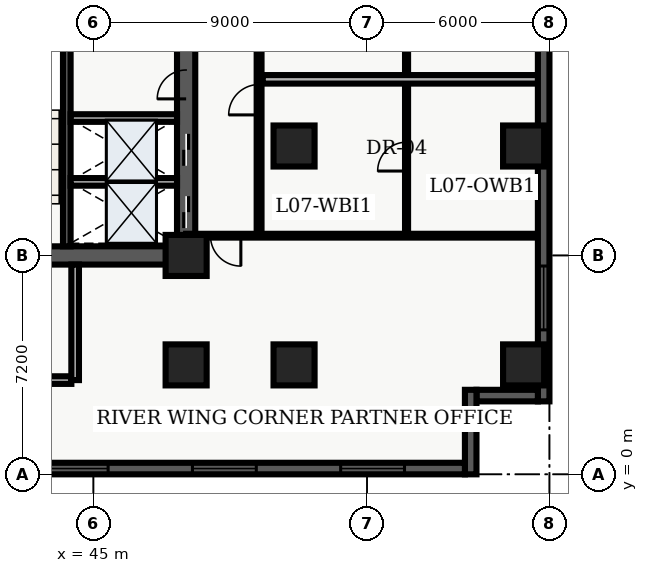
"""IFC4 building model, lengths in metres.
Left out: names, types, materials, properties, quantities, classifications, styles, units other than length and angle.
Written with IfcOpenShell. Run it as: python <this file> out.ifc"""

import sys

from ifc_helpers import new_model, entity, si_unit, converted_unit, direction, frame, origin_with_axes, origin_2d_with_axis, place, context, subcontext, project, spatial, polyline, rectangle, outline, extrude, element, fill, save


model = new_model("IFC4")
c1 = context("Model", 3, precision=1e-05, world=origin_with_axes(), true_north=direction((0.0, 1.0)))
c2 = subcontext(c1, "Body", "Model", "MODEL_VIEW")
j1 = project(units=[si_unit("LENGTHUNIT", "METRE"), converted_unit("PLANEANGLEUNIT", "DEGREE", entity("IfcPlaneAngleMeasure", 0.017), si_unit("PLANEANGLEUNIT", "RADIAN"), dimensions=[0, 0, 0, 0, 0, 0, 0])], contexts=[c1])
p1 = place(None, origin_with_axes())
s1 = spatial("IfcSite", under=j1, at=p1, CompositionType="ELEMENT")
p2 = place(p1, origin_with_axes())
s2 = spatial("IfcBuilding", under=s1, at=p2, CompositionType="ELEMENT")
p3 = place(p2, frame((0.0, 0.0, 32.7), z_axis=(0.0, 0.0, 1.0), x_axis=(1.0, 0.0, 0.0)))
s3 = spatial("IfcBuildingStorey", under=s2, at=p3, CompositionType="ELEMENT", Elevation=32.7)
p4 = place(p3, frame((40.2, 7.2, 0.0), z_axis=(0.0, 0.0, 1.0), x_axis=(1.0, 0.0, 0.0)))
e1 = element("IfcWall", 1, at=p4, inside=s3, PredefinedType="SHEAR", context=c2, shape_type="SweptSolid", body=[
    extrude(outline(polyline([(0.0, -0.3), (7.85, -0.3), (7.85, 0.3), (0.0, 0.3), (0.0, -0.3)])), origin_with_axes(), (0.0, 0.0, 1.0), 3.66),
])
p5 = place(p4, frame((2.175, 0.0, 0.0), z_axis=(0.0, 0.0, 1.0), x_axis=(1.0, 0.0, 0.0)))
e2 = element("IfcOpeningElement", 2, at=p5, cuts=e1, PredefinedType="OPENING", context=c2, shape_type="SweptSolid", body=[
    extrude(rectangle(XDim=1.05, YDim=0.62, at=origin_2d_with_axis()), origin_with_axes(), (0.0, 0.0, 1.0), 2.15),
])
p6 = place(p3, frame((48.05, 7.2, 0.0), z_axis=(0.0, 0.0, 1.0), x_axis=(0.0, 1.0, 0.0)))
e3 = element("IfcWall", 3, at=p6, inside=s3, PredefinedType="SHEAR", context=c2, shape_type="SweptSolid", body=[
    extrude(outline(polyline([(0.0, -0.3), (15.6, -0.3), (15.6, 0.3), (0.0, 0.3), (0.0, -0.3)])), origin_with_axes(), (0.0, 0.0, 1.0), 3.66),
])
p7 = place(p6, frame((1.425, 0.0, 0.0), z_axis=(0.0, 0.0, 1.0), x_axis=(1.0, 0.0, 0.0)))
e4 = element("IfcOpeningElement", 4, at=p7, cuts=e3, PredefinedType="OPENING", context=c2, shape_type="SweptSolid", body=[
    extrude(rectangle(XDim=1.05, YDim=0.62, at=origin_2d_with_axis()), origin_with_axes(), (0.0, 0.0, 1.0), 2.15),
])
p8 = place(p6, frame((3.475, 0.0, 0.0), z_axis=(0.0, 0.0, 1.0), x_axis=(1.0, 0.0, 0.0)))
e5 = element("IfcOpeningElement", 5, at=p8, cuts=e3, PredefinedType="OPENING", context=c2, shape_type="SweptSolid", body=[
    extrude(rectangle(XDim=1.05, YDim=0.62, at=origin_2d_with_axis()), origin_with_axes(), (0.0, 0.0, 1.0), 2.15),
])
p9 = place(p6, frame((5.625, 0.0, 0.0), z_axis=(0.0, 0.0, 1.0), x_axis=(1.0, 0.0, 0.0)))
e6 = element("IfcOpeningElement", 6, at=p9, cuts=e3, PredefinedType="OPENING", context=c2, shape_type="SweptSolid", body=[
    extrude(rectangle(XDim=0.95, YDim=0.62, at=origin_2d_with_axis()), origin_with_axes(), (0.0, 0.0, 1.0), 2.15),
])
p10 = place(p3, frame((44.125, 7.5, 0.0), z_axis=(0.0, 0.0, 1.0), x_axis=(0.0, 1.0, 0.0)))
e7 = element("IfcWall", 7, at=p10, inside=s3, PredefinedType="SHEAR", context=c2, shape_type="SweptSolid", body=[
    extrude(outline(polyline([(0.0, -0.125), (15.0, -0.125), (15.0, 0.125), (0.0, 0.125), (0.0, -0.125)])), origin_with_axes(), (0.0, 0.0, 1.0), 3.66),
])
p11 = place(p3, frame((40.325, 3.1, 0.0), z_axis=(0.0, 0.0, 1.0), x_axis=(1.0, 0.0, 0.0)))
e8 = element("IfcWall", 8, at=p11, inside=s3, PredefinedType="SOLIDWALL", context=c2, shape_type="SweptSolid", body=[
    extrude(outline(polyline([(0.0, -0.125), (3.95, -0.125), (3.95, 0.125), (0.0, 0.125), (0.0, -0.125)])), origin_with_axes(), (0.0, 0.0, 1.0), 2.7),
])
p12 = place(p3, frame((44.4, 3.1, 0.0), z_axis=(0.0, 0.0, 1.0), x_axis=(0.0, 1.0, 0.0)))
e9 = element("IfcWall", 9, at=p12, inside=s3, PredefinedType="SOLIDWALL", context=c2, shape_type="SweptSolid", body=[
    extrude(outline(polyline([(0.0, -0.125), (3.8, -0.125), (3.8, 0.125), (0.0, 0.125), (0.0, -0.125)])), origin_with_axes(), (0.0, 0.0, 1.0), 2.7),
])
for number, where, z_axis, x_axis in (
    (10, (48.05, 3.6, 0.0), (0.0, 0.0, 1.0), (1.0, 0.0, 0.0)),
    (11, (48.05, 7.2, 0.0), (0.0, 0.0, 1.0), (1.0, 0.0, 0.0)),
    (12, (51.6, 3.6, 0.0), (0.0, 0.0, 1.0), (1.0, 0.0, 0.0)),
    (13, (51.6, 10.8, 0.0), (0.0, 0.0, 1.0), (1.0, 0.0, 0.0)),
    (14, (59.15, 3.6, 0.0), (0.0, 0.0, 1.0), (1.0, 0.0, 0.0)),
    (15, (59.15, 10.8, 0.0), (0.0, 0.0, 1.0), (1.0, 0.0, 0.0)),
):
    element("IfcColumn", number, at=place(p3, frame(where, z_axis=z_axis, x_axis=x_axis)), inside=s3, PredefinedType="COLUMN", context=c2, shape_type="SweptSolid", body=[
        extrude(rectangle(XDim=1.35, YDim=1.35, at=origin_2d_with_axis()), origin_with_axes(), (0.0, 0.0, 1.0), 3.9),
    ])
for number, where, z_axis, x_axis in (
    (16, (44.25, 9.62, 0.0), (0.0, 0.0, 1.0), (1.0, 0.0, 0.0)),
    (17, (44.25, 11.72, 0.0), (0.0, 0.0, 1.0), (1.0, 0.0, 0.0)),
):
    element("IfcWall", number, at=place(p3, frame(where, z_axis=z_axis, x_axis=x_axis)), inside=s3, PredefinedType="SOLIDWALL", context=c2, shape_type="SweptSolid", body=[
        extrude(outline(polyline([(0.0, -0.125), (3.5, -0.125), (3.5, 0.125), (0.0, 0.125), (0.0, -0.125)])), origin_with_axes(), (0.0, 0.0, 1.0), 2.7),
    ])
p13 = place(p3, frame((50.45, 7.85, 0.0), z_axis=(0.0, 0.0, 1.0), x_axis=(0.0, 1.0, 0.0)))
e18 = element("IfcWall", 18, at=p13, inside=s3, PredefinedType="PARTITIONING", context=c2, shape_type="SweptSolid", body=[
    extrude(outline(polyline([(0.0, -0.08), (18.8, -0.08), (18.8, 0.08), (0.0, 0.08), (0.0, -0.08)])), origin_with_axes(), (0.0, 0.0, 1.0), 2.7),
])
p14 = place(p13, frame((4.473, 0.0, 0.0), z_axis=(0.0, 0.0, 1.0), x_axis=(1.0, 0.0, 0.0)))
e19 = element("IfcOpeningElement", 19, at=p14, cuts=e18, PredefinedType="OPENING", context=c2, shape_type="SweptSolid", body=[
    extrude(rectangle(XDim=1.0, YDim=0.18, at=origin_2d_with_axis()), origin_with_axes(), (0.0, 0.0, 1.0), 2.15),
])
p15 = place(p13, frame((7.597, 0.0, 0.0), z_axis=(0.0, 0.0, 1.0), x_axis=(1.0, 0.0, 0.0)))
e20 = element("IfcOpeningElement", 20, at=p15, cuts=e18, PredefinedType="OPENING", context=c2, shape_type="SweptSolid", body=[
    extrude(rectangle(XDim=1.0, YDim=0.18, at=origin_2d_with_axis()), origin_with_axes(), (0.0, 0.0, 1.0), 2.15),
])
p16 = place(p13, frame((14.075, 0.0, 0.0), z_axis=(0.0, 0.0, 1.0), x_axis=(1.0, 0.0, 0.0)))
e21 = element("IfcOpeningElement", 21, at=p16, cuts=e18, PredefinedType="OPENING", context=c2, shape_type="SweptSolid", body=[
    extrude(rectangle(XDim=1.0, YDim=0.18, at=origin_2d_with_axis()), origin_with_axes(), (0.0, 0.0, 1.0), 2.15),
])
p17 = place(p3, frame((59.64, 7.85, 0.0), z_axis=(0.0, 0.0, 1.0), x_axis=(-1.0, 0.0, 0.0)))
e22 = element("IfcWall", 22, at=p17, inside=s3, PredefinedType="PARTITIONING", context=c2, shape_type="SweptSolid", body=[
    extrude(outline(polyline([(0.0, -0.062), (11.59, -0.062), (11.59, 0.062), (0.0, 0.062), (0.0, -0.062)])), origin_with_axes(), (0.0, 0.0, 1.0), 2.7),
])
p18 = place(p17, frame((10.29, 0.0, 0.0), z_axis=(0.0, 0.0, 1.0), x_axis=(1.0, 0.0, 0.0)))
e23 = element("IfcOpeningElement", 23, at=p18, cuts=e22, PredefinedType="OPENING", context=c2, shape_type="SweptSolid", body=[
    extrude(rectangle(XDim=1.0, YDim=0.145, at=origin_2d_with_axis()), origin_with_axes(), (0.0, 0.0, 1.0), 2.15),
])
p19 = place(p3, frame((55.3, 7.98, 0.0), z_axis=(0.0, 0.0, 1.0), x_axis=(0.0, 1.0, 0.0)))
e24 = element("IfcWall", 24, at=p19, inside=s3, PredefinedType="PARTITIONING", context=c2, shape_type="SweptSolid", body=[
    extrude(outline(polyline([(0.0, -0.05), (18.54, -0.05), (18.54, 0.05), (0.0, 0.05), (0.0, -0.05)])), origin_with_axes(), (0.0, 0.0, 1.0), 2.7),
])
p20 = place(p19, frame((2.471, 0.0, 0.0), z_axis=(0.0, 0.0, 1.0), x_axis=(1.0, 0.0, 0.0)))
e25 = element("IfcOpeningElement", 25, at=p20, cuts=e24, PredefinedType="OPENING", context=c2, shape_type="SweptSolid", body=[
    extrude(rectangle(XDim=0.95, YDim=0.12, at=origin_2d_with_axis()), origin_with_axes(), (0.0, 0.0, 1.0), 2.15),
])
p21 = place(p19, frame((8.027, 0.0, 0.0), z_axis=(0.0, 0.0, 1.0), x_axis=(1.0, 0.0, 0.0)))
e26 = element("IfcOpeningElement", 26, at=p21, cuts=e24, PredefinedType="OPENING", context=c2, shape_type="SweptSolid", body=[
    extrude(rectangle(XDim=0.95, YDim=0.12, at=origin_2d_with_axis()), origin_with_axes(), (0.0, 0.0, 1.0), 2.15),
])
p22 = place(p19, frame((14.825, 0.0, 0.0), z_axis=(0.0, 0.0, 1.0), x_axis=(1.0, 0.0, 0.0)))
e27 = element("IfcOpeningElement", 27, at=p22, cuts=e24, PredefinedType="OPENING", context=c2, shape_type="SweptSolid", body=[
    extrude(rectangle(XDim=0.95, YDim=0.12, at=origin_2d_with_axis()), origin_with_axes(), (0.0, 0.0, 1.0), 2.15),
])
p23 = place(p3, frame((50.57, 12.993, 0.0), z_axis=(0.0, 0.0, 1.0), x_axis=(1.0, 0.0, 0.0)))
e28 = element("IfcWall", 28, at=p23, inside=s3, PredefinedType="PARTITIONING", context=c2, shape_type="SweptSolid", body=[
    extrude(outline(polyline([(0.0, -0.14), (9.055, -0.14), (9.055, 0.14), (0.0, 0.14), (0.0, -0.14)])), origin_with_axes(), (0.0, 0.0, 1.0), 2.7),
])
p24 = place(p3, frame((59.81, 26.02, 0.0), z_axis=(0.0, 0.0, 1.0), x_axis=(0.0, -1.0, 0.0)))
e29 = element("IfcWall", 29, at=p24, inside=s3, PredefinedType="SOLIDWALL", context=c2, shape_type="SweptSolid", body=[
    extrude(outline(polyline([(0.0, -0.19), (23.62, -0.19), (23.62, 0.19), (0.0, 0.19), (0.0, -0.19)])), origin_with_axes(), (0.0, 0.0, 1.0), 3.66),
])
p25 = place(p24, frame((3.853, 0.0, 0.45), z_axis=(0.0, 0.0, 1.0), x_axis=(1.0, 0.0, 0.0)))
e30 = element("IfcOpeningElement", 30, at=p25, cuts=e29, PredefinedType="OPENING", context=c2, shape_type="SweptSolid", body=[
    extrude(rectangle(XDim=2.1, YDim=0.4, at=origin_2d_with_axis()), origin_with_axes(), (0.0, 0.0, 1.0), 2.2),
])
p26 = place(p24, frame((20.218, 0.0, 0.45), z_axis=(0.0, 0.0, 1.0), x_axis=(1.0, 0.0, 0.0)))
e31 = element("IfcOpeningElement", 31, at=p26, cuts=e29, PredefinedType="OPENING", context=c2, shape_type="SweptSolid", body=[
    extrude(rectangle(XDim=2.1, YDim=0.4, at=origin_2d_with_axis()), origin_with_axes(), (0.0, 0.0, 1.0), 2.2),
])
p27 = place(p3, frame((59.62, 2.59, 0.0), z_axis=(0.0, 0.0, 1.0), x_axis=(-1.0, 0.0, 0.0)))
e32 = element("IfcWall", 32, at=p27, inside=s3, PredefinedType="SOLIDWALL", context=c2, shape_type="SweptSolid", body=[
    extrude(outline(polyline([(0.0, -0.19), (2.02, -0.19), (2.02, 0.19), (0.0, 0.19), (0.0, -0.19)])), origin_with_axes(), (0.0, 0.0, 1.0), 3.66),
])
p28 = place(p3, frame((57.41, 2.78, 0.0), z_axis=(0.0, 0.0, 1.0), x_axis=(0.0, -1.0, 0.0)))
e33 = element("IfcWall", 33, at=p28, inside=s3, PredefinedType="SOLIDWALL", context=c2, shape_type="SweptSolid", body=[
    extrude(outline(polyline([(0.0, -0.19), (2.78, -0.19), (2.78, 0.19), (0.0, 0.19), (0.0, -0.19)])), origin_with_axes(), (0.0, 0.0, 1.0), 3.66),
])
p29 = place(p3, frame((57.22, 0.19, 0.0), z_axis=(0.0, 0.0, 1.0), x_axis=(-1.0, 0.0, 0.0)))
e34 = element("IfcWall", 34, at=p29, inside=s3, PredefinedType="SOLIDWALL", context=c2, shape_type="SweptSolid", body=[
    extrude(outline(polyline([(0.0, -0.19), (54.82, -0.19), (54.82, 0.19), (0.0, 0.19), (0.0, -0.19)])), origin_with_axes(), (0.0, 0.0, 1.0), 3.66),
])
p30 = place(p29, frame((3.037, 0.0, 0.45), z_axis=(0.0, 0.0, 1.0), x_axis=(1.0, 0.0, 0.0)))
e35 = element("IfcOpeningElement", 35, at=p30, cuts=e34, PredefinedType="OPENING", context=c2, shape_type="SweptSolid", body=[
    extrude(rectangle(XDim=2.1, YDim=0.4, at=origin_2d_with_axis()), origin_with_axes(), (0.0, 0.0, 1.0), 2.2),
])
p31 = place(p29, frame((7.912, 0.0, 0.45), z_axis=(0.0, 0.0, 1.0), x_axis=(1.0, 0.0, 0.0)))
e36 = element("IfcOpeningElement", 36, at=p31, cuts=e34, PredefinedType="OPENING", context=c2, shape_type="SweptSolid", body=[
    extrude(rectangle(XDim=2.1, YDim=0.4, at=origin_2d_with_axis()), origin_with_axes(), (0.0, 0.0, 1.0), 2.2),
])
p32 = place(p29, frame((12.786, 0.0, 0.45), z_axis=(0.0, 0.0, 1.0), x_axis=(1.0, 0.0, 0.0)))
e37 = element("IfcOpeningElement", 37, at=p32, cuts=e34, PredefinedType="OPENING", context=c2, shape_type="SweptSolid", body=[
    extrude(rectangle(XDim=2.1, YDim=0.4, at=origin_2d_with_axis()), origin_with_axes(), (0.0, 0.0, 1.0), 2.2),
])
p33 = place(p29, frame((17.661, 0.0, 0.45), z_axis=(0.0, 0.0, 1.0), x_axis=(1.0, 0.0, 0.0)))
e38 = element("IfcOpeningElement", 38, at=p33, cuts=e34, PredefinedType="OPENING", context=c2, shape_type="SweptSolid", body=[
    extrude(rectangle(XDim=2.1, YDim=0.4, at=origin_2d_with_axis()), origin_with_axes(), (0.0, 0.0, 1.0), 2.2),
])
p34 = place(p29, frame((22.535, 0.0, 0.45), z_axis=(0.0, 0.0, 1.0), x_axis=(1.0, 0.0, 0.0)))
e39 = element("IfcOpeningElement", 39, at=p34, cuts=e34, PredefinedType="OPENING", context=c2, shape_type="SweptSolid", body=[
    extrude(rectangle(XDim=2.1, YDim=0.4, at=origin_2d_with_axis()), origin_with_axes(), (0.0, 0.0, 1.0), 2.2),
])
p35 = place(p29, frame((27.41, 0.0, 0.45), z_axis=(0.0, 0.0, 1.0), x_axis=(1.0, 0.0, 0.0)))
e40 = element("IfcOpeningElement", 40, at=p35, cuts=e34, PredefinedType="OPENING", context=c2, shape_type="SweptSolid", body=[
    extrude(rectangle(XDim=2.1, YDim=0.4, at=origin_2d_with_axis()), origin_with_axes(), (0.0, 0.0, 1.0), 2.2),
])
p36 = place(p29, frame((32.285, 0.0, 0.45), z_axis=(0.0, 0.0, 1.0), x_axis=(1.0, 0.0, 0.0)))
e41 = element("IfcOpeningElement", 41, at=p36, cuts=e34, PredefinedType="OPENING", context=c2, shape_type="SweptSolid", body=[
    extrude(rectangle(XDim=2.1, YDim=0.4, at=origin_2d_with_axis()), origin_with_axes(), (0.0, 0.0, 1.0), 2.2),
])
p37 = place(p29, frame((37.159, 0.0, 0.45), z_axis=(0.0, 0.0, 1.0), x_axis=(1.0, 0.0, 0.0)))
e42 = element("IfcOpeningElement", 42, at=p37, cuts=e34, PredefinedType="OPENING", context=c2, shape_type="SweptSolid", body=[
    extrude(rectangle(XDim=2.1, YDim=0.4, at=origin_2d_with_axis()), origin_with_axes(), (0.0, 0.0, 1.0), 2.2),
])
p38 = place(p29, frame((42.034, 0.0, 0.45), z_axis=(0.0, 0.0, 1.0), x_axis=(1.0, 0.0, 0.0)))
e43 = element("IfcOpeningElement", 43, at=p38, cuts=e34, PredefinedType="OPENING", context=c2, shape_type="SweptSolid", body=[
    extrude(rectangle(XDim=2.1, YDim=0.4, at=origin_2d_with_axis()), origin_with_axes(), (0.0, 0.0, 1.0), 2.2),
])
p39 = place(p29, frame((51.783, 0.0, 0.45), z_axis=(0.0, 0.0, 1.0), x_axis=(1.0, 0.0, 0.0)))
e44 = element("IfcOpeningElement", 44, at=p39, cuts=e34, PredefinedType="OPENING", context=c2, shape_type="SweptSolid", body=[
    extrude(rectangle(XDim=2.1, YDim=0.4, at=origin_2d_with_axis()), origin_with_axes(), (0.0, 0.0, 1.0), 2.2),
])
p40 = place(p6, frame((1.425, 0.0, 0.0), z_axis=(0.0, 0.0, 1.0), x_axis=(1.0, 0.0, 0.0)))
e45 = element("IfcDoor", 45, at=p40, inside=s3, OperationType="SLIDING_TO_LEFT", PredefinedType="DOOR", context=c2, shape_type="SweptSolid", body=[
    extrude(rectangle(XDim=1.05, YDim=0.09, at=origin_2d_with_axis()), origin_with_axes(), (0.0, 0.0, 1.0), 2.15),
])
fill(e4, e45)
p41 = place(p6, frame((3.475, 0.0, 0.0), z_axis=(0.0, 0.0, 1.0), x_axis=(1.0, 0.0, 0.0)))
e46 = element("IfcDoor", 46, at=p41, inside=s3, OperationType="SLIDING_TO_RIGHT", PredefinedType="DOOR", context=c2, shape_type="SweptSolid", body=[
    extrude(rectangle(XDim=1.05, YDim=0.09, at=origin_2d_with_axis()), origin_with_axes(), (0.0, 0.0, 1.0), 2.15),
])
fill(e5, e46)
p42 = place(p6, frame((5.625, 0.0, 0.0), z_axis=(0.0, 0.0, 1.0), x_axis=(1.0, 0.0, 0.0)))
e47 = element("IfcDoor", 47, at=p42, inside=s3, OperationType="SINGLE_SWING_LEFT", PredefinedType="DOOR", context=c2, shape_type="SweptSolid", body=[
    extrude(rectangle(XDim=0.95, YDim=0.09, at=origin_2d_with_axis()), origin_with_axes(), (0.0, 0.0, 1.0), 2.15),
])
fill(e6, e47)
p43 = place(p17, frame((10.29, 0.0, 0.0), z_axis=(0.0, 0.0, 1.0), x_axis=(1.0, 0.0, 0.0)))
e48 = element("IfcDoor", 48, at=p43, inside=s3, OperationType="SINGLE_SWING_LEFT", PredefinedType="DOOR", context=c2, shape_type="SweptSolid", body=[
    extrude(rectangle(XDim=1.0, YDim=0.075, at=origin_2d_with_axis()), origin_with_axes(), (0.0, 0.0, 1.0), 2.15),
])
fill(e23, e48)
p44 = place(p19, frame((2.471, 0.0, 0.0), z_axis=(0.0, 0.0, 1.0), x_axis=(1.0, 0.0, 0.0)))
e49 = element("IfcDoor", 49, at=p44, inside=s3, OperationType="SINGLE_SWING_LEFT", PredefinedType="DOOR", context=c2, shape_type="SweptSolid", body=[
    extrude(rectangle(XDim=0.95, YDim=0.06, at=origin_2d_with_axis()), origin_with_axes(), (0.0, 0.0, 1.0), 2.15),
])
fill(e25, e49)
p45 = place(p13, frame((4.473, 0.0, 0.0), z_axis=(0.0, 0.0, 1.0), x_axis=(1.0, 0.0, 0.0)))
e50 = element("IfcDoor", 50, at=p45, inside=s3, OperationType="SINGLE_SWING_LEFT", PredefinedType="DOOR", context=c2, shape_type="SweptSolid", body=[
    extrude(rectangle(XDim=1.0, YDim=0.09, at=origin_2d_with_axis()), origin_with_axes(), (0.0, 0.0, 1.0), 2.15),
])
fill(e19, e50)
p46 = place(p24, frame((20.218, 0.0, 0.45), z_axis=(0.0, 0.0, 1.0), x_axis=(1.0, 0.0, 0.0)))
e51 = element("IfcWindow", 51, at=p46, inside=s3, PredefinedType="WINDOW", context=c2, shape_type="SweptSolid", body=[
    extrude(rectangle(XDim=2.1, YDim=0.09, at=origin_2d_with_axis()), origin_with_axes(), (0.0, 0.0, 1.0), 2.2),
])
fill(e31, e51)
p47 = place(p29, frame((3.037, 0.0, 0.45), z_axis=(0.0, 0.0, 1.0), x_axis=(1.0, 0.0, 0.0)))
e52 = element("IfcWindow", 52, at=p47, inside=s3, PredefinedType="WINDOW", context=c2, shape_type="SweptSolid", body=[
    extrude(rectangle(XDim=2.1, YDim=0.09, at=origin_2d_with_axis()), origin_with_axes(), (0.0, 0.0, 1.0), 2.2),
])
fill(e35, e52)
p48 = place(p29, frame((7.912, 0.0, 0.45), z_axis=(0.0, 0.0, 1.0), x_axis=(1.0, 0.0, 0.0)))
e53 = element("IfcWindow", 53, at=p48, inside=s3, PredefinedType="WINDOW", context=c2, shape_type="SweptSolid", body=[
    extrude(rectangle(XDim=2.1, YDim=0.09, at=origin_2d_with_axis()), origin_with_axes(), (0.0, 0.0, 1.0), 2.2),
])
fill(e36, e53)
p49 = place(p29, frame((12.786, 0.0, 0.45), z_axis=(0.0, 0.0, 1.0), x_axis=(1.0, 0.0, 0.0)))
e54 = element("IfcWindow", 54, at=p49, inside=s3, PredefinedType="WINDOW", context=c2, shape_type="SweptSolid", body=[
    extrude(rectangle(XDim=2.1, YDim=0.09, at=origin_2d_with_axis()), origin_with_axes(), (0.0, 0.0, 1.0), 2.2),
])
fill(e37, e54)
save(model, sys.argv[1])
